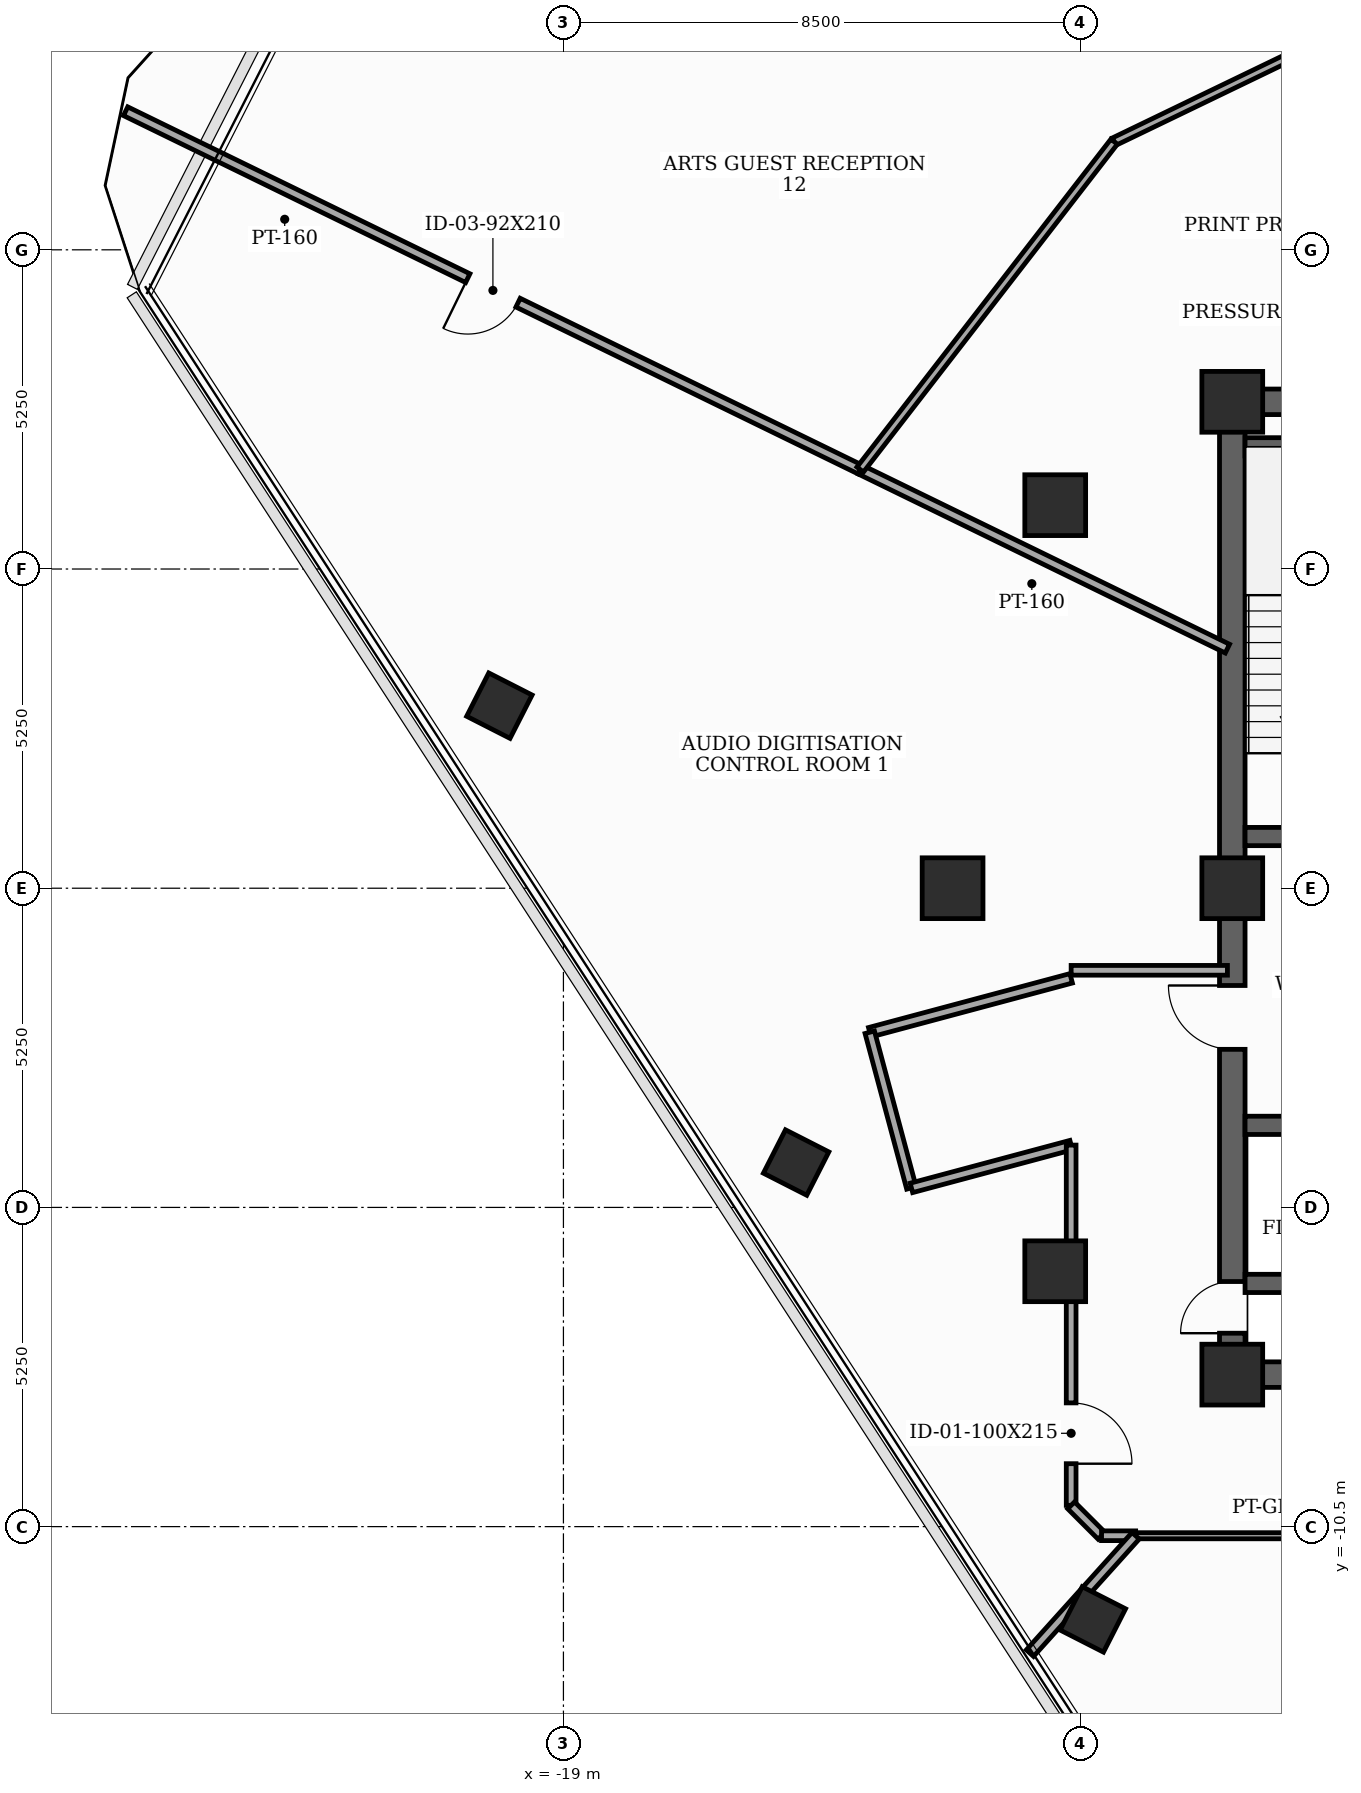
"""IFC4 building model, lengths in metres.
Left out: names, types, materials, properties, quantities, classifications, styles, units other than length and angle.
Written with IfcOpenShell. Run it as: python <this file> out.ifc"""

import sys

from ifc_helpers import new_model, si_unit, direction, frame, frame_2d, origin, origin_2d, place, context, subcontext, project, spatial, rectangle, extrude, element, fill, save


model = new_model("IFC4")
c1 = context("Model", 3, precision=1e-05, world=origin(), true_north=direction((0.0, 1.0)))
c2 = subcontext(c1, "Body", "Model", "MODEL_VIEW")
j1 = project(units=[si_unit("LENGTHUNIT", "METRE"), si_unit("PLANEANGLEUNIT", "RADIAN")], contexts=[c1])
p1 = place(None, origin())
s1 = spatial("IfcSite", under=j1, at=p1, CompositionType="ELEMENT")
p2 = place(p1, origin())
s2 = spatial("IfcBuilding", under=s1, at=p2, CompositionType="ELEMENT")
p3 = place(p2, frame((0.0, 0.0, 252.2)))
s3 = spatial("IfcBuildingStorey", under=s2, at=p3, CompositionType="ELEMENT", Elevation=252.2)
for number, where, z_axis, x_axis in (
    (1, (-8.0, -8.0, 0.0), (0.0, 0.0, 1.0), (1.0, 0.0, 0.0)),
    (2, (-8.0, 8.0, 0.0), (0.0, 0.0, 1.0), (1.0, 0.0, 0.0)),
    (3, (-8.0, 0.0, 0.0), (0.0, 0.0, 1.0), (1.0, 0.0, 0.0)),
    (4, (-10.912, 6.3, 0.0), (0.0, 0.0, 1.0), (1.0, 0.0, 0.0)),
    (5, (-12.6, 0.0, 0.0), (0.0, 0.0, 1.0), (1.0, 0.0, 0.0)),
    (6, (-10.912, -6.3, 0.0), (0.0, 0.0, 1.0), (1.0, 0.0, 0.0)),
):
    element("IfcColumn", number, at=place(p3, frame(where, z_axis=z_axis, x_axis=x_axis)), inside=s3, PredefinedType="COLUMN", context=c2, shape_type="SweptSolid", body=[
        extrude(rectangle(XDim=1.0, YDim=1.0, at=origin_2d()), origin(), (0.0, 0.0, 1.0), 3.7),
    ])
for number, where, z_axis, x_axis in (
    (7, (-20.053, 3.003, 0.0), (0.0, 0.0, 1.0), (0.454, 0.891, 0.0)),
    (8, (-15.173, -4.512, 0.0), (0.0, 0.0, 1.0), (0.454, 0.891, 0.0)),
    (9, (-10.293, -12.026, 0.0), (0.0, 0.0, 1.0), (0.454, 0.891, 0.0)),
):
    element("IfcColumn", number, at=place(p3, frame(where, z_axis=z_axis, x_axis=x_axis)), inside=s3, PredefinedType="COLUMN", context=c2, shape_type="SweptSolid", body=[
        extrude(rectangle(XDim=0.8, YDim=0.8, at=origin_2d()), origin(), (0.0, 0.0, 1.0), 3.7),
    ])
p4 = place(p3, frame((-8.0, -8.0, 0.0), z_axis=(0.0, 0.0, 1.0), x_axis=(0.0, 1.0, 0.0)))
e10 = element("IfcWall", 10, at=p4, inside=s3, PredefinedType="SHEAR", context=c2, shape_type="SweptSolid", body=[
    extrude(rectangle(XDim=16.0, YDim=0.42, at=frame_2d((8.0, 0.0))), origin(), (0.0, 0.0, 1.0), 3.5),
])
p5 = place(p4, frame((0.681, 0.0, 0.0)))
e11 = element("IfcOpeningElement", 11, at=p5, cuts=e10, PredefinedType="OPENING", context=c2, shape_type="SweptSolid", body=[
    extrude(rectangle(XDim=0.85, YDim=2.02, at=frame_2d((0.425, 1.01))), frame((0.0, 0.22, 0.0), z_axis=(0.0, -1.0, 0.0), x_axis=(1.0, 0.0, 0.0)), (0.0, 0.0, 1.0), 0.44),
])
p6 = place(p4, frame((5.35, 0.0, 0.0)))
e12 = element("IfcOpeningElement", 12, at=p6, cuts=e10, PredefinedType="OPENING", context=c2, shape_type="SweptSolid", body=[
    extrude(rectangle(XDim=1.05, YDim=2.15, at=frame_2d((0.525, 1.075))), frame((0.0, 0.22, 0.0), z_axis=(0.0, -1.0, 0.0), x_axis=(1.0, 0.0, 0.0)), (0.0, 0.0, 1.0), 0.44),
])
p7 = place(p3, frame((-8.0, -8.0, 0.0), z_axis=(0.0, 0.0, 1.0), x_axis=(1.0, 0.0, 0.0)))
e13 = element("IfcWall", 13, at=p7, inside=s3, PredefinedType="SHEAR", context=c2, shape_type="SweptSolid", body=[
    extrude(rectangle(XDim=16.0, YDim=0.42, at=frame_2d((8.0, 0.0))), origin(), (0.0, 0.0, 1.0), 3.5),
])
p8 = place(p7, frame((7.52, 0.0, 0.0)))
e14 = element("IfcOpeningElement", 14, at=p8, cuts=e13, PredefinedType="OPENING", context=c2, shape_type="SweptSolid", body=[
    extrude(rectangle(XDim=0.95, YDim=2.1, at=frame_2d((0.475, 1.05))), frame((0.0, 0.22, 0.0), z_axis=(0.0, -1.0, 0.0), x_axis=(1.0, 0.0, 0.0)), (0.0, 0.0, 1.0), 0.44),
])
p9 = place(p3, frame((-8.0, 8.0, 0.0), z_axis=(0.0, 0.0, 1.0), x_axis=(1.0, 0.0, 0.0)))
e15 = element("IfcWall", 15, at=p9, inside=s3, PredefinedType="SHEAR", context=c2, shape_type="SweptSolid", body=[
    extrude(rectangle(XDim=16.0, YDim=0.42, at=frame_2d((8.0, 0.0))), origin(), (0.0, 0.0, 1.0), 3.5),
])
p10 = place(p9, frame((7.1, 0.0, 0.0)))
e16 = element("IfcOpeningElement", 16, at=p10, cuts=e15, PredefinedType="OPENING", context=c2, shape_type="SweptSolid", body=[
    extrude(rectangle(XDim=1.8, YDim=2.15, at=frame_2d((0.9, 1.075))), frame((0.0, 0.22, 0.0), z_axis=(0.0, -1.0, 0.0), x_axis=(1.0, 0.0, 0.0)), (0.0, 0.0, 1.0), 0.44),
])
p11 = place(p3, frame((-7.79, 0.85, 0.0), z_axis=(0.0, 0.0, 1.0), x_axis=(1.0, 0.0, 0.0)))
e17 = element("IfcWall", 17, at=p11, inside=s3, PredefinedType="SHEAR", context=c2, shape_type="SweptSolid", body=[
    extrude(rectangle(XDim=3.34, YDim=0.3, at=frame_2d((1.67, 0.0))), origin(), (0.0, 0.0, 1.0), 3.5),
])
p12 = place(p11, frame((1.85, 0.0, 0.0)))
e18 = element("IfcOpeningElement", 18, at=p12, cuts=e17, PredefinedType="OPENING", context=c2, shape_type="SweptSolid", body=[
    extrude(rectangle(XDim=1.05, YDim=2.15, at=frame_2d((0.525, 1.075))), frame((0.0, 0.16, 0.0), z_axis=(0.0, -1.0, 0.0), x_axis=(1.0, 0.0, 0.0)), (0.0, 0.0, 1.0), 0.32),
])
p13 = place(p3, frame((-7.79, 7.26, 0.0), z_axis=(0.0, 0.0, 1.0), x_axis=(1.0, 0.0, 0.0)))
e19 = element("IfcWall", 19, at=p13, inside=s3, PredefinedType="SHEAR", context=c2, shape_type="SweptSolid", body=[
    extrude(rectangle(XDim=3.34, YDim=0.3, at=frame_2d((1.67, 0.0))), origin(), (0.0, 0.0, 1.0), 3.5),
])
p14 = place(p3, frame((-7.79, -3.9, 0.0), z_axis=(0.0, 0.0, 1.0), x_axis=(1.0, 0.0, 0.0)))
e20 = element("IfcWall", 20, at=p14, inside=s3, PredefinedType="SHEAR", context=c2, shape_type="SweptSolid", body=[
    extrude(rectangle(XDim=3.34, YDim=0.3, at=frame_2d((1.67, 0.0))), origin(), (0.0, 0.0, 1.0), 3.5),
])
p15 = place(p14, frame((1.27, 0.0, 0.0)))
e21 = element("IfcOpeningElement", 21, at=p15, cuts=e20, PredefinedType="OPENING", context=c2, shape_type="SweptSolid", body=[
    extrude(rectangle(XDim=1.1, YDim=2.1, at=frame_2d((0.55, 1.05))), frame((0.0, 0.16, 0.0), z_axis=(0.0, -1.0, 0.0), x_axis=(1.0, 0.0, 0.0)), (0.0, 0.0, 1.0), 0.32),
])
p16 = place(p3, frame((-7.79, -6.5, 0.0), z_axis=(0.0, 0.0, 1.0), x_axis=(1.0, 0.0, 0.0)))
e22 = element("IfcWall", 22, at=p16, inside=s3, PredefinedType="SHEAR", context=c2, shape_type="SweptSolid", body=[
    extrude(rectangle(XDim=3.34, YDim=0.3, at=frame_2d((1.67, 0.0))), origin(), (0.0, 0.0, 1.0), 3.5),
])
p17 = place(p3, frame((-8.08, -1.35, 0.0), z_axis=(0.0, 0.0, 1.0), x_axis=(-1.0, 0.0, 0.0)))
e23 = element("IfcWall", 23, at=p17, inside=s3, PredefinedType="PARTITIONING", context=c2, shape_type="SweptSolid", body=[
    extrude(rectangle(XDim=2.57, YDim=0.16, at=frame_2d((1.285, 0.0))), origin(), (0.0, 0.0, 1.0), 2.885),
])
p18 = place(p3, frame((-10.65, -1.482, 0.0), z_axis=(0.0, 0.0, 1.0), x_axis=(-0.965961397105, -0.2586862565, 0.0)))
e24 = element("IfcWall", 24, at=p18, inside=s3, PredefinedType="PARTITIONING", context=c2, shape_type="SweptSolid", body=[
    extrude(rectangle(XDim=3.429, YDim=0.16, at=frame_2d((1.714, 0.0))), origin(), (0.0, 0.0, 1.0), 2.885),
])
p19 = place(p3, frame((-13.962, -2.369, 0.0), z_axis=(0.0, 0.0, 1.0), x_axis=(0.258413725385, -0.966034340245, 0.0)))
e25 = element("IfcWall", 25, at=p19, inside=s3, PredefinedType="PARTITIONING", context=c2, shape_type="SweptSolid", body=[
    extrude(rectangle(XDim=2.65, YDim=0.16, at=frame_2d((1.325, 0.0))), origin(), (0.0, 0.0, 1.0), 3.5),
])
p20 = place(p3, frame((-13.277, -4.929, 0.0), z_axis=(0.0, 0.0, 1.0), x_axis=(0.965934830229, 0.258785439601, 0.0)))
e26 = element("IfcWall", 26, at=p20, inside=s3, PredefinedType="PARTITIONING", context=c2, shape_type="SweptSolid", body=[
    extrude(rectangle(XDim=2.72, YDim=0.16, at=frame_2d((1.36, 0.0))), origin(), (0.0, 0.0, 1.0), 2.885),
])
p21 = place(p3, frame((-10.65, -4.225, 0.0), z_axis=(0.0, 0.0, 1.0), x_axis=(0.0, -1.0, 0.0)))
e27 = element("IfcWall", 27, at=p21, inside=s3, PredefinedType="PARTITIONING", context=c2, shape_type="SweptSolid", body=[
    extrude(rectangle(XDim=5.925, YDim=0.16, at=frame_2d((2.962, 0.0))), origin(), (0.0, 0.0, 1.0), 2.885),
])
p22 = place(p21, frame((4.24, 0.0, 0.0)))
e28 = element("IfcOpeningElement", 28, at=p22, cuts=e27, PredefinedType="OPENING", context=c2, shape_type="SweptSolid", body=[
    extrude(rectangle(XDim=1.0, YDim=2.15, at=frame_2d((0.5, 1.075))), frame((0.0, 0.09, 0.0), z_axis=(0.0, -1.0, 0.0), x_axis=(1.0, 0.0, 0.0)), (0.0, 0.0, 1.0), 0.18),
])
p23 = place(p3, frame((-10.65, -10.15, 0.0), z_axis=(0.0, 0.0, 1.0), x_axis=(0.707106781187, -0.707106781187, 0.0)))
e29 = element("IfcWall", 29, at=p23, inside=s3, PredefinedType="PARTITIONING", context=c2, shape_type="SweptSolid", body=[
    extrude(rectangle(XDim=0.707, YDim=0.16, at=frame_2d((0.354, 0.0))), origin(), (0.0, 0.0, 1.0), 3.5),
])
p24 = place(p3, frame((-10.15, -10.65, 0.0), z_axis=(0.0, 0.0, 1.0), x_axis=(1.0, 0.0, 0.0)))
e30 = element("IfcWall", 30, at=p24, inside=s3, PredefinedType="PARTITIONING", context=c2, shape_type="SweptSolid", body=[
    extrude(rectangle(XDim=0.561, YDim=0.16, at=frame_2d((0.28, 0.0))), origin(), (0.0, 0.0, 1.0), 3.5),
])
p25 = place(p3, frame((-9.589, -10.65, 0.0), z_axis=(0.0, 0.0, 1.0), x_axis=(1.0, 0.0, 0.0)))
e31 = element("IfcWall", 31, at=p25, inside=s3, PredefinedType="MOVABLE", context=c2, shape_type="SweptSolid", body=[
    extrude(rectangle(XDim=4.739, YDim=0.1, at=frame_2d((2.37, 0.0))), origin(), (0.0, 0.0, 1.0), 2.885),
])
p26 = place(p3, frame((-11.328, -12.581, 0.0), z_axis=(0.0, 0.0, 1.0), x_axis=(0.669120437161, 0.743153981739, 0.0)))
e32 = element("IfcWall", 32, at=p26, inside=s3, PredefinedType="PARTITIONING", context=c2, shape_type="SweptSolid", body=[
    extrude(rectangle(XDim=2.599, YDim=0.16, at=frame_2d((1.299, 0.0))), origin(), (0.0, 0.0, 1.0), 3.035),
])
p27 = place(p3, frame((-8.08, 3.941, 0.0), z_axis=(0.0, 0.0, 1.0), x_axis=(-0.898794985177, 0.438369221798, 0.0)))
e33 = element("IfcWall", 33, at=p27, inside=s3, PredefinedType="PARTITIONING", context=c2, shape_type="SweptSolid", body=[
    extrude(rectangle(XDim=6.719, YDim=0.16, at=frame_2d((3.359, 0.0))), origin(), (0.0, 0.0, 1.0), 2.885),
])
p28 = place(p3, frame((-14.119, 6.886, 0.0), z_axis=(0.0, 0.0, 1.0), x_axis=(-0.898768620199, 0.438423274184, 0.0)))
e34 = element("IfcWall", 34, at=p28, inside=s3, PredefinedType="PARTITIONING", context=c2, shape_type="SweptSolid", body=[
    extrude(rectangle(XDim=13.442, YDim=0.16, at=frame_2d((6.721, 0.0))), origin(), (0.0, 0.0, 1.0), 3.035),
])
p29 = place(p28, frame((6.261, 0.0, 0.0)))
e35 = element("IfcOpeningElement", 35, at=p29, cuts=e34, PredefinedType="OPENING", context=c2, shape_type="SweptSolid", body=[
    extrude(rectangle(XDim=0.92, YDim=2.1, at=frame_2d((0.46, 1.05))), frame((0.0, 0.09, 0.0), z_axis=(0.0, -1.0, 0.0), x_axis=(1.0, 0.0, 0.0)), (0.0, 0.0, 1.0), 0.18),
])
p30 = place(p3, frame((-3.8, 15.242, 0.0), z_axis=(0.0, 0.0, 1.0), x_axis=(-0.900708156853, -0.434424695635, 0.0)))
e36 = element("IfcWall", 36, at=p30, inside=s3, PredefinedType="PARTITIONING", context=c2, shape_type="SweptSolid", body=[
    extrude(rectangle(XDim=6.82, YDim=0.135, at=frame_2d((3.41, 0.0))), origin(), (0.0, 0.0, 1.0), 3.035),
])
p31 = place(p3, frame((-9.943, 12.279, 0.0), z_axis=(0.0, 0.0, 1.0), x_axis=(-0.612219395693, -0.790687935621, 0.0)))
e37 = element("IfcWall", 37, at=p31, inside=s3, PredefinedType="PARTITIONING", context=c2, shape_type="SweptSolid", body=[
    extrude(rectangle(XDim=6.821, YDim=0.135, at=frame_2d((3.41, 0.0))), origin(), (0.0, 0.0, 1.0), 3.185),
])
p32 = place(p5, origin())
e38 = element("IfcDoor", 38, at=p32, inside=s3, OperationType="SINGLE_SWING_LEFT", PredefinedType="TRAPDOOR", context=c2, shape_type="SweptSolid", body=[
    extrude(rectangle(XDim=0.85, YDim=2.02, at=frame_2d((0.425, 1.01))), frame((0.0, 0.025, 0.0), z_axis=(0.0, -1.0, 0.0), x_axis=(1.0, 0.0, 0.0)), (0.0, 0.0, 1.0), 0.05),
])
fill(e11, e38)
p33 = place(p6, origin())
e39 = element("IfcDoor", 39, at=p33, inside=s3, OperationType="SINGLE_SWING_RIGHT", PredefinedType="DOOR", context=c2, shape_type="SweptSolid", body=[
    extrude(rectangle(XDim=1.05, YDim=2.15, at=frame_2d((0.525, 1.075))), frame((0.0, 0.025, 0.0), z_axis=(0.0, -1.0, 0.0), x_axis=(1.0, 0.0, 0.0)), (0.0, 0.0, 1.0), 0.05),
])
fill(e12, e39)
p34 = place(p22, origin())
e40 = element("IfcDoor", 40, at=p34, inside=s3, OperationType="SINGLE_SWING_RIGHT", PredefinedType="DOOR", context=c2, shape_type="SweptSolid", body=[
    extrude(rectangle(XDim=1.0, YDim=2.15, at=frame_2d((0.5, 1.075))), frame((0.0, 0.025, 0.0), z_axis=(0.0, -1.0, 0.0), x_axis=(1.0, 0.0, 0.0)), (0.0, 0.0, 1.0), 0.05),
])
fill(e28, e40)
p35 = place(p29, origin())
e41 = element("IfcDoor", 41, at=p35, inside=s3, OperationType="SINGLE_SWING_RIGHT", PredefinedType="DOOR", context=c2, shape_type="SweptSolid", body=[
    extrude(rectangle(XDim=0.92, YDim=2.1, at=frame_2d((0.46, 1.05))), frame((0.0, 0.025, 0.0), z_axis=(0.0, -1.0, 0.0), x_axis=(1.0, 0.0, 0.0)), (0.0, 0.0, 1.0), 0.05),
])
fill(e35, e41)
save(model, sys.argv[1])
